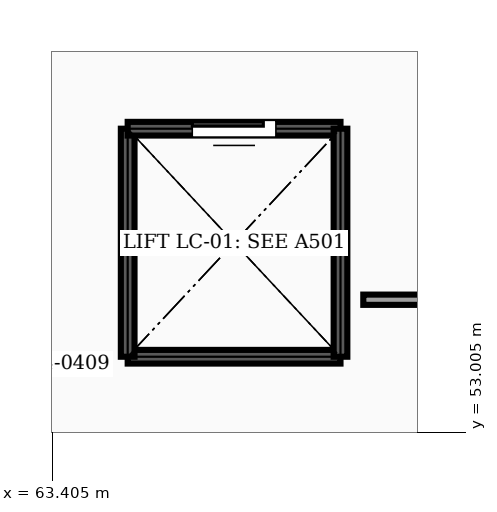
"""IFC4 building model, lengths in metres.
Left out: names, types, materials, properties, quantities, classifications, styles, units other than length and angle.
Written with IfcOpenShell. Run it as: python <this file> out.ifc"""

import sys

from ifc_helpers import new_model, si_unit, direction, frame, frame_2d, origin, place, context, subcontext, project, spatial, rectangle, extrude, element, fill, save


model = new_model("IFC4")
c1 = context("Model", 3, precision=1e-05, world=origin(), true_north=direction((0.0, 1.0)))
c2 = subcontext(c1, "Body", "Model", "MODEL_VIEW")
j1 = project(units=[si_unit("LENGTHUNIT", "METRE"), si_unit("PLANEANGLEUNIT", "RADIAN")], contexts=[c1])
p1 = place(None, origin())
s1 = spatial("IfcSite", under=j1, at=p1, CompositionType="ELEMENT")
p2 = place(p1, origin())
s2 = spatial("IfcBuilding", under=s1, at=p2, CompositionType="ELEMENT")
p3 = place(p2, frame((0.0, 0.0, 16.1)))
s3 = spatial("IfcBuildingStorey", under=s2, at=p3, CompositionType="ELEMENT", Elevation=16.1)
p4 = place(p3, frame((67.2, 54.0, 0.0), z_axis=(0.0, 0.0, 1.0), x_axis=(-1.0, 0.0, 0.0)))
e1 = element("IfcWall", 1, at=p4, inside=s3, PredefinedType="SHEAR", context=c2, shape_type="SweptSolid", body=[
    extrude(rectangle(XDim=2.8, YDim=0.18, at=frame_2d((1.4, 0.0))), origin(), (0.0, 0.0, 1.0), 3.61),
])
p5 = place(p3, frame((64.4, 54.0, 0.0), z_axis=(0.0, 0.0, 1.0), x_axis=(0.0, 1.0, 0.0)))
e2 = element("IfcWall", 2, at=p5, inside=s3, PredefinedType="SHEAR", context=c2, shape_type="SweptSolid", body=[
    extrude(rectangle(XDim=3.0, YDim=0.18, at=frame_2d((1.5, 0.0))), origin(), (0.0, 0.0, 1.0), 3.61),
])
p6 = place(p3, frame((64.4, 57.0, 0.0), z_axis=(0.0, 0.0, 1.0), x_axis=(1.0, 0.0, 0.0)))
e3 = element("IfcWall", 3, at=p6, inside=s3, PredefinedType="SHEAR", context=c2, shape_type="SweptSolid", body=[
    extrude(rectangle(XDim=2.8, YDim=0.18, at=frame_2d((1.4, 0.0))), origin(), (0.0, 0.0, 1.0), 3.61),
])
p7 = place(p6, frame((0.85, 0.0, 0.0)))
e4 = element("IfcOpeningElement", 4, at=p7, cuts=e3, PredefinedType="OPENING", context=c2, shape_type="SweptSolid", body=[
    extrude(rectangle(XDim=1.1, YDim=2.15, at=frame_2d((0.55, 1.075))), frame((0.0, 0.1, 0.0), z_axis=(0.0, -1.0, 0.0), x_axis=(1.0, 0.0, 0.0)), (0.0, 0.0, 1.0), 0.2),
])
p8 = place(p3, frame((67.2, 57.0, 0.0), z_axis=(0.0, 0.0, 1.0), x_axis=(0.0, -1.0, 0.0)))
e5 = element("IfcWall", 5, at=p8, inside=s3, PredefinedType="SHEAR", context=c2, shape_type="SweptSolid", body=[
    extrude(rectangle(XDim=3.0, YDim=0.18, at=frame_2d((1.5, 0.0))), origin(), (0.0, 0.0, 1.0), 3.61),
])
p9 = place(p3, frame((71.84, 54.75, 0.0), z_axis=(0.0, 0.0, 1.0), x_axis=(-1.0, 0.0, 0.0)))
e6 = element("IfcWall", 6, at=p9, inside=s3, PredefinedType="PARTITIONING", context=c2, shape_type="SweptSolid", body=[
    extrude(rectangle(XDim=4.34, YDim=0.135, at=frame_2d((2.17, 0.0))), origin(), (0.0, 0.0, 1.0), 3.61),
])
p10 = place(p9, frame((1.67, 0.0, 0.0)))
e7 = element("IfcOpeningElement", 7, at=p10, cuts=e6, PredefinedType="OPENING", context=c2, shape_type="SweptSolid", body=[
    extrude(rectangle(XDim=1.0, YDim=2.15, at=frame_2d((0.5, 1.075))), frame((0.0, 0.077, 0.0), z_axis=(0.0, -1.0, 0.0), x_axis=(1.0, 0.0, 0.0)), (0.0, 0.0, 1.0), 0.155),
])
p11 = place(p3, frame((64.1, 53.9, 0.0), z_axis=(0.0, 0.0, 1.0), x_axis=(-1.0, 0.0, 0.0)))
e8 = element("IfcWall", 8, at=p11, inside=s3, PredefinedType="PARTITIONING", context=c2, shape_type="SweptSolid", body=[
    extrude(rectangle(XDim=1.6, YDim=0.12, at=frame_2d((0.8, 0.0))), origin(), (0.0, 0.0, 1.0), 3.61),
])
p12 = place(p7, origin())
e9 = element("IfcDoor", 9, at=p12, inside=s3, OperationType="SLIDING_TO_LEFT", PredefinedType="DOOR", context=c2, shape_type="SweptSolid", body=[
    extrude(rectangle(XDim=1.1, YDim=2.15, at=frame_2d((0.55, 1.075))), frame((0.0, 0.025, 0.0), z_axis=(0.0, -1.0, 0.0), x_axis=(1.0, 0.0, 0.0)), (0.0, 0.0, 1.0), 0.05),
])
fill(e4, e9)
save(model, sys.argv[1])
